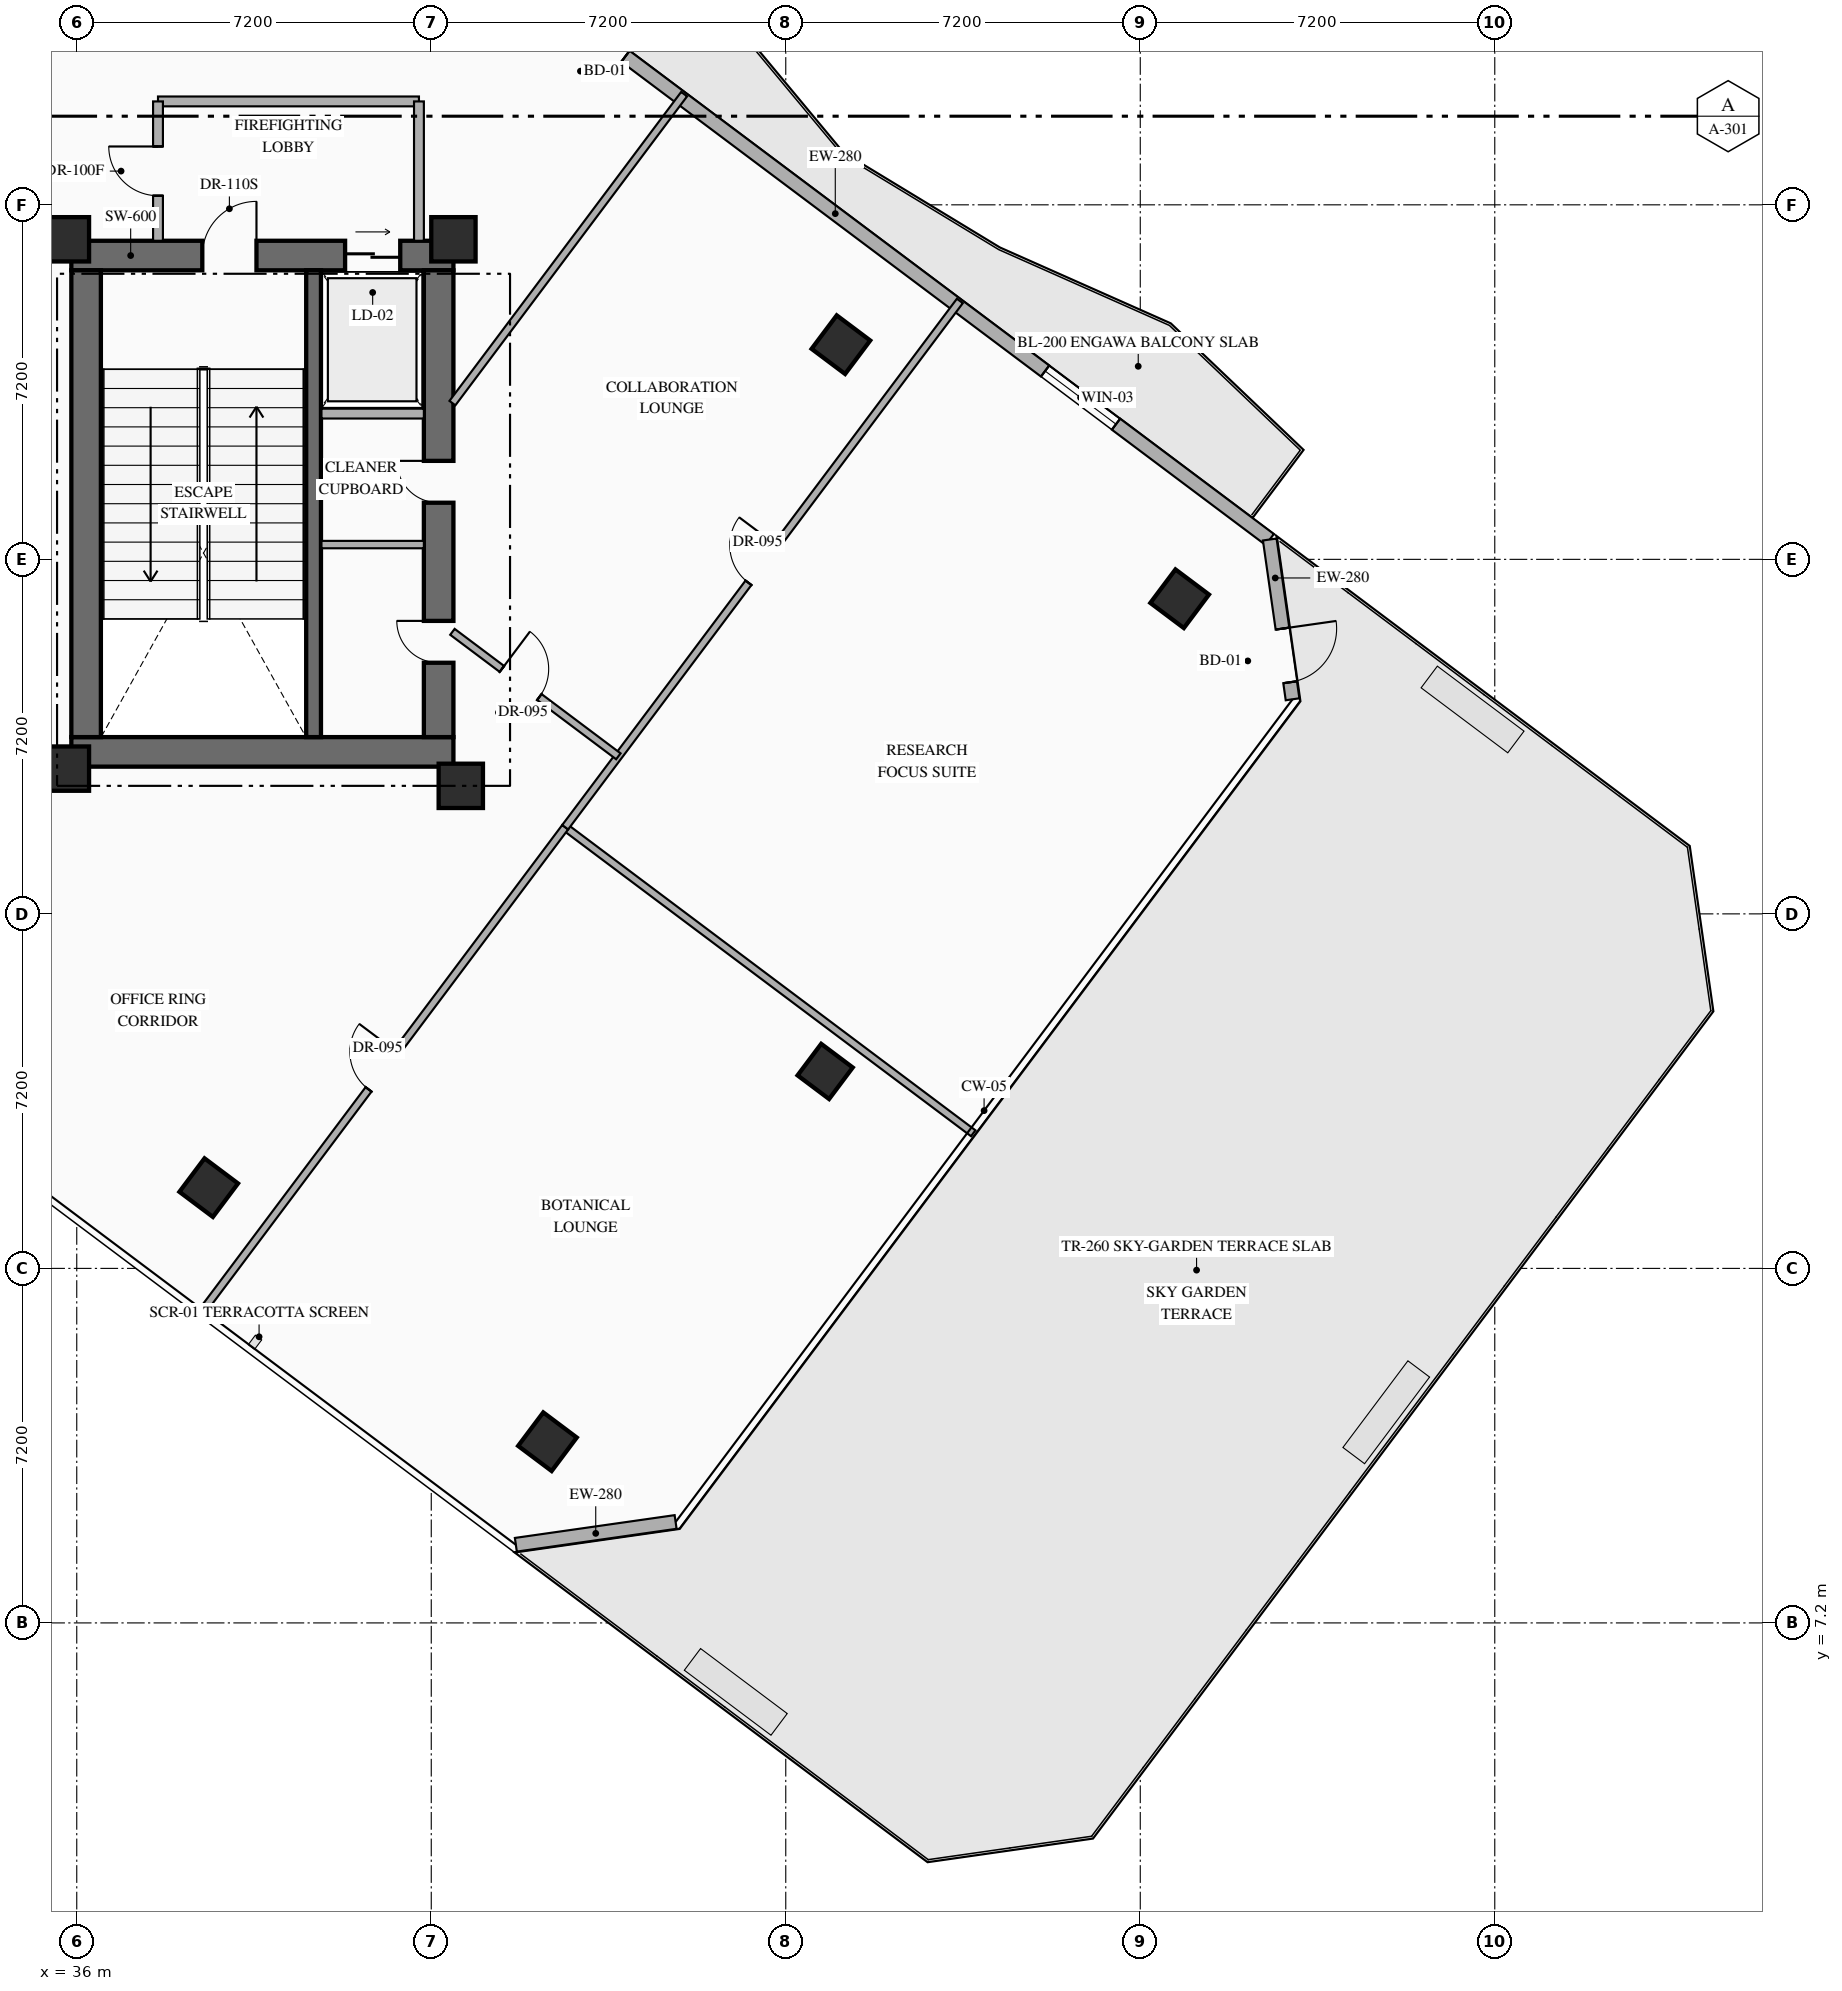
"""IFC4 building model, lengths in metres.
Left out: names, types, materials, properties, quantities, classifications, styles, units other than length and angle.
Written with IfcOpenShell. Run it as: python <this file> out.ifc"""

import sys

from ifc_helpers import new_model, si_unit, direction, frame, frame_2d, origin, origin_2d, place, context, subcontext, project, spatial, rectangle, hollow_rectangle, extrude, element, fill, save


model = new_model("IFC4")
c1 = context("Model", 3, precision=1e-05, world=origin(), true_north=direction((0.0, 1.0)))
c2 = subcontext(c1, "Body", "Model", "MODEL_VIEW")
j1 = project(units=[si_unit("LENGTHUNIT", "METRE"), si_unit("PLANEANGLEUNIT", "RADIAN")], contexts=[c1])
p1 = place(None, origin())
s1 = spatial("IfcSite", under=j1, at=p1, CompositionType="ELEMENT")
p2 = place(p1, origin())
s2 = spatial("IfcBuilding", under=s1, at=p2, CompositionType="ELEMENT")
p3 = place(p2, frame((0.0, 0.0, 130.05)))
s3 = spatial("IfcBuildingStorey", under=s2, at=p3, CompositionType="ELEMENT", Elevation=130.05)
p4 = place(p3, frame((35.89, 24.89, 0.0), z_axis=(0.0, 0.0, 1.0), x_axis=(1.0, 0.0, 0.0)))
e1 = element("IfcWall", 1, at=p4, inside=s3, PredefinedType="SHEAR", context=c2, shape_type="SweptSolid", body=[
    extrude(rectangle(XDim=7.76, YDim=0.6, at=frame_2d((3.88, 0.0))), origin(), (0.0, 0.0, 1.0), 4.8),
])
p5 = place(p3, frame((35.89, 34.97, 0.0), z_axis=(0.0, 0.0, 1.0), x_axis=(1.0, 0.0, 0.0)))
e2 = element("IfcWall", 2, at=p5, inside=s3, PredefinedType="SHEAR", context=c2, shape_type="SweptSolid", body=[
    extrude(rectangle(XDim=7.76, YDim=0.6, at=frame_2d((3.88, 0.0))), origin(), (0.0, 0.0, 1.0), 4.8),
])
p6 = place(p5, frame((2.66, 0.0, 0.0)))
e3 = element("IfcOpeningElement", 3, at=p6, cuts=e2, PredefinedType="OPENING", context=c2, shape_type="SweptSolid", body=[
    extrude(rectangle(XDim=1.1, YDim=2.2, at=frame_2d((0.55, 1.1))), frame((0.0, 0.31, 0.0), z_axis=(0.0, -1.0, 0.0), x_axis=(1.0, 0.0, 0.0)), (0.0, 0.0, 1.0), 0.62),
])
p7 = place(p5, frame((5.56, 0.0, 0.0)))
e4 = element("IfcOpeningElement", 4, at=p7, cuts=e2, PredefinedType="OPENING", context=c2, shape_type="SweptSolid", body=[
    extrude(rectangle(XDim=1.12, YDim=2.15, at=frame_2d((0.56, 1.075))), frame((0.0, 0.31, 0.0), z_axis=(0.0, -1.0, 0.0), x_axis=(1.0, 0.0, 0.0)), (0.0, 0.0, 1.0), 0.62),
])
p8 = place(p3, frame((36.19, 25.19, 0.0), z_axis=(0.0, 0.0, 1.0), x_axis=(0.0, 1.0, 0.0)))
e5 = element("IfcWall", 5, at=p8, inside=s3, PredefinedType="SHEAR", context=c2, shape_type="SweptSolid", body=[
    extrude(rectangle(XDim=9.48, YDim=0.6, at=frame_2d((4.74, 0.0))), origin(), (0.0, 0.0, 1.0), 4.8),
])
p9 = place(p3, frame((43.35, 25.19, 0.0), z_axis=(0.0, 0.0, 1.0), x_axis=(0.0, 1.0, 0.0)))
e6 = element("IfcWall", 6, at=p9, inside=s3, PredefinedType="SHEAR", context=c2, shape_type="SweptSolid", body=[
    extrude(rectangle(XDim=9.48, YDim=0.6, at=frame_2d((4.74, 0.0))), origin(), (0.0, 0.0, 1.0), 4.8),
])
p10 = place(p9, frame((1.51, 0.0, 0.0)))
e7 = element("IfcOpeningElement", 7, at=p10, cuts=e6, PredefinedType="OPENING", context=c2, shape_type="SweptSolid", body=[
    extrude(rectangle(XDim=0.85, YDim=2.08, at=frame_2d((0.425, 1.04))), frame((0.0, 0.31, 0.0), z_axis=(0.0, -1.0, 0.0), x_axis=(1.0, 0.0, 0.0)), (0.0, 0.0, 1.0), 0.62),
])
p11 = place(p9, frame((4.76, 0.0, 0.0)))
e8 = element("IfcOpeningElement", 8, at=p11, cuts=e6, PredefinedType="OPENING", context=c2, shape_type="SweptSolid", body=[
    extrude(rectangle(XDim=0.85, YDim=2.08, at=frame_2d((0.425, 1.04))), frame((0.0, 0.31, 0.0), z_axis=(0.0, -1.0, 0.0), x_axis=(1.0, 0.0, 0.0)), (0.0, 0.0, 1.0), 0.62),
])
p12 = place(p3, frame((40.81, 25.19, 0.0), z_axis=(0.0, 0.0, 1.0), x_axis=(0.0, 1.0, 0.0)))
e9 = element("IfcWall", 9, at=p12, inside=s3, PredefinedType="SHEAR", context=c2, shape_type="SweptSolid", body=[
    extrude(rectangle(XDim=9.48, YDim=0.3, at=frame_2d((4.74, 0.0))), origin(), (0.0, 0.0, 1.0), 4.8),
])
for number, where, z_axis, x_axis in (
    (10, (35.8, 24.55, 0.0), (0.0, 0.0, 1.0), (1.0, 0.0, 0.0)),
    (11, (43.8, 24.2, 0.0), (0.0, 0.0, 1.0), (1.0, 0.0, 0.0)),
    (12, (35.8, 35.3, 0.0), (0.0, 0.0, 1.0), (1.0, 0.0, 0.0)),
    (13, (43.65, 35.3, 0.0), (0.0, 0.0, 1.0), (1.0, 0.0, 0.0)),
):
    element("IfcColumn", number, at=place(p3, frame(where, z_axis=z_axis, x_axis=x_axis)), inside=s3, PredefinedType="COLUMN", context=c2, shape_type="SweptSolid", body=[
        extrude(rectangle(XDim=0.9, YDim=0.9, at=origin_2d()), origin(), (0.0, 0.0, 1.0), 4.8),
    ])
for number, where, z_axis, x_axis in (
    (14, (38.68, 16.04, 0.0), (0.0, 0.0, 1.0), (0.8, -0.6, 0.0)),
    (15, (51.52, 33.16, 0.0), (0.0, 0.0, 1.0), (0.8, -0.6, 0.0)),
    (16, (45.56, 10.88, 0.0), (0.0, 0.0, 1.0), (0.8, -0.6, 0.0)),
    (17, (58.4, 28.0, 0.0), (0.0, 0.0, 1.0), (0.8, -0.6, 0.0)),
):
    element("IfcColumn", number, at=place(p3, frame(where, z_axis=z_axis, x_axis=x_axis)), inside=s3, PredefinedType="COLUMN", context=c2, shape_type="SweptSolid", body=[
        extrude(hollow_rectangle(XDim=0.85, YDim=0.85, WallThickness=0.032, at=origin_2d()), origin(), (0.0, 0.0, 1.0), 4.8),
    ])
p13 = place(p3, frame((51.2, 18.4, 0.0), z_axis=(0.0, 0.0, 1.0), x_axis=(0.799999996291, -0.600000004945, 0.0)))
e18 = element("IfcColumn", 18, at=p13, inside=s3, PredefinedType="COLUMN", context=c2, shape_type="SweptSolid", body=[
    extrude(hollow_rectangle(XDim=0.8, YDim=0.8, WallThickness=0.032, at=origin_2d()), origin(), (0.0, 0.0, 1.0), 4.8),
])
p14 = place(p3, frame((44.86, 40.73, 0.0), z_axis=(0.0, 0.0, 1.0), x_axis=(0.800007624502, -0.599989833863, 0.0)))
e19 = element("IfcWall", 19, at=p14, inside=s3, PredefinedType="STANDARD", context=c2, shape_type="SweptSolid", body=[
    extrude(rectangle(XDim=19.212, YDim=0.28, at=frame_2d((9.606, 0.0))), origin(), (0.0, 0.0, 1.0), 4.55),
])
p15 = place(p14, frame((1.755, 0.0, 0.0)))
e20 = element("IfcOpeningElement", 20, at=p15, cuts=e19, PredefinedType="OPENING", context=c2, shape_type="SweptSolid", body=[
    extrude(rectangle(XDim=1.1, YDim=2.2, at=frame_2d((0.55, 1.1))), frame((0.0, 0.15, 0.0), z_axis=(0.0, -1.0, 0.0), x_axis=(1.0, 0.0, 0.0)), (0.0, 0.0, 1.0), 0.3),
])
p16 = place(p14, frame((13.509, 0.0, 0.85)))
e21 = element("IfcOpeningElement", 21, at=p16, cuts=e19, PredefinedType="OPENING", context=c2, shape_type="SweptSolid", body=[
    extrude(rectangle(XDim=1.8, YDim=2.1, at=frame_2d((0.9, 1.05))), frame((0.0, 0.15, 0.0), z_axis=(0.0, -1.0, 0.0), x_axis=(1.0, 0.0, 0.0)), (0.0, 0.0, 1.0), 0.3),
])
p17 = place(p3, frame((60.23, 29.203, 0.0), z_axis=(0.0, 0.0, 1.0), x_axis=(0.141296221922, -0.989967361922, 0.0)))
e22 = element("IfcWall", 22, at=p17, inside=s3, PredefinedType="STANDARD", context=c2, shape_type="SweptSolid", body=[
    extrude(rectangle(XDim=3.278, YDim=0.28, at=frame_2d((1.639, 0.0))), origin(), (0.0, 0.0, 1.0), 4.55),
])
p18 = place(p17, frame((1.828, 0.0, 0.0)))
e23 = element("IfcOpeningElement", 23, at=p18, cuts=e22, PredefinedType="OPENING", context=c2, shape_type="SweptSolid", body=[
    extrude(rectangle(XDim=1.1, YDim=2.2, at=frame_2d((0.55, 1.1))), frame((0.0, 0.15, 0.0), z_axis=(0.0, -1.0, 0.0), x_axis=(1.0, 0.0, 0.0)), (0.0, 0.0, 1.0), 0.3),
])
p19 = place(p3, frame((48.163, 9.25, 0.0), z_axis=(0.0, 0.0, 1.0), x_axis=(-0.989979263428, -0.141212810973, 0.0)))
e24 = element("IfcWall", 24, at=p19, inside=s3, PredefinedType="STANDARD", context=c2, shape_type="SweptSolid", body=[
    extrude(rectangle(XDim=3.278, YDim=0.28, at=frame_2d((1.639, 0.0))), origin(), (0.0, 0.0, 1.0), 4.55),
])
p20 = place(p3, frame((40.97, 31.76, 0.0), z_axis=(0.0, 0.0, 1.0), x_axis=(1.0, 0.0, 0.0)))
e25 = element("IfcWall", 25, at=p20, inside=s3, PredefinedType="STANDARD", context=c2, shape_type="SweptSolid", body=[
    extrude(rectangle(XDim=2.08, YDim=0.2, at=frame_2d((1.04, 0.0))), origin(), (0.0, 0.0, 1.0), 4.55),
])
p21 = place(p3, frame((40.97, 29.1, 0.0), z_axis=(0.0, 0.0, 1.0), x_axis=(1.0, 0.0, 0.0)))
e26 = element("IfcWall", 26, at=p21, inside=s3, PredefinedType="PARTITIONING", context=c2, shape_type="SweptSolid", body=[
    extrude(rectangle(XDim=2.08, YDim=0.15, at=frame_2d((1.04, 0.0))), origin(), (0.0, 0.0, 1.0), 4.55),
])
p22 = place(p3, frame((37.65, 38.1, 0.0), z_axis=(0.0, 0.0, 1.0), x_axis=(1.0, 0.0, 0.0)))
e27 = element("IfcWall", 27, at=p22, inside=s3, PredefinedType="STANDARD", context=c2, shape_type="SweptSolid", body=[
    extrude(rectangle(XDim=5.3, YDim=0.2, at=frame_2d((2.65, 0.0))), origin(), (0.0, 0.0, 1.0), 4.55),
])
p23 = place(p3, frame((42.95, 35.27, 0.0), z_axis=(0.0, 0.0, 1.0), x_axis=(0.0, 1.0, 0.0)))
e28 = element("IfcWall", 28, at=p23, inside=s3, PredefinedType="STANDARD", context=c2, shape_type="SweptSolid", body=[
    extrude(rectangle(XDim=2.83, YDim=0.2, at=frame_2d((1.415, 0.0))), origin(), (0.0, 0.0, 1.0), 4.55),
])
p24 = place(p3, frame((37.65, 35.27, 0.0), z_axis=(0.0, 0.0, 1.0), x_axis=(0.0, 1.0, 0.0)))
e29 = element("IfcWall", 29, at=p24, inside=s3, PredefinedType="STANDARD", context=c2, shape_type="SweptSolid", body=[
    extrude(rectangle(XDim=2.83, YDim=0.2, at=frame_2d((1.415, 0.0))), origin(), (0.0, 0.0, 1.0), 4.55),
])
p25 = place(p24, frame((0.915, 0.0, 0.0)))
e30 = element("IfcOpeningElement", 30, at=p25, cuts=e29, PredefinedType="OPENING", context=c2, shape_type="SweptSolid", body=[
    extrude(rectangle(XDim=1.0, YDim=2.2, at=frame_2d((0.5, 1.1))), frame((0.0, 0.11, 0.0), z_axis=(0.0, -1.0, 0.0), x_axis=(1.0, 0.0, 0.0)), (0.0, 0.0, 1.0), 0.22),
])
p26 = place(p3, frame((45.92, 23.36, 0.0), z_axis=(0.0, 0.0, 1.0), x_axis=(0.8, -0.6, 0.0)))
e31 = element("IfcWall", 31, at=p26, inside=s3, PredefinedType="PARTITIONING", context=c2, shape_type="SweptSolid", body=[
    extrude(rectangle(XDim=10.36, YDim=0.15, at=frame_2d((5.18, 0.0))), origin(), (0.0, 0.0, 1.0), 4.55),
])
p27 = place(p3, frame((38.504, 13.472, 0.0), z_axis=(0.0, 0.0, 1.0), x_axis=(0.599993679268, 0.80000474051, 0.0)))
e32 = element("IfcWall", 32, at=p27, inside=s3, PredefinedType="PARTITIONING", context=c2, shape_type="SweptSolid", body=[
    extrude(rectangle(XDim=12.36, YDim=0.15, at=frame_2d((6.18, 0.0))), origin(), (0.0, 0.0, 1.0), 4.55),
])
p28 = place(p27, frame((5.705, 0.0, 0.0)))
e33 = element("IfcOpeningElement", 33, at=p28, cuts=e32, PredefinedType="OPENING", context=c2, shape_type="SweptSolid", body=[
    extrude(rectangle(XDim=0.95, YDim=2.15, at=frame_2d((0.475, 1.075))), frame((0.0, 0.085, 0.0), z_axis=(0.0, -1.0, 0.0), x_axis=(1.0, 0.0, 0.0)), (0.0, 0.0, 1.0), 0.17),
])
p29 = place(p3, frame((45.92, 23.36, 0.0), z_axis=(0.0, 0.0, 1.0), x_axis=(0.600005847638, 0.799995614238, 0.0)))
e34 = element("IfcWall", 34, at=p29, inside=s3, PredefinedType="PARTITIONING", context=c2, shape_type="SweptSolid", body=[
    extrude(rectangle(XDim=13.36, YDim=0.15, at=frame_2d((6.68, 0.0))), origin(), (0.0, 0.0, 1.0), 4.55),
])
p30 = place(p29, frame((6.205, 0.0, 0.0)))
e35 = element("IfcOpeningElement", 35, at=p30, cuts=e34, PredefinedType="OPENING", context=c2, shape_type="SweptSolid", body=[
    extrude(rectangle(XDim=0.95, YDim=2.15, at=frame_2d((0.475, 1.075))), frame((0.0, 0.085, 0.0), z_axis=(0.0, -1.0, 0.0), x_axis=(1.0, 0.0, 0.0)), (0.0, 0.0, 1.0), 0.17),
])
p31 = place(p3, frame((43.63, 27.328, 0.0), z_axis=(0.0, 0.0, 1.0), x_axis=(0.799972182084, -0.600037088764, 0.0)))
e36 = element("IfcWall", 36, at=p31, inside=s3, PredefinedType="PARTITIONING", context=c2, shape_type="SweptSolid", body=[
    extrude(rectangle(XDim=4.213, YDim=0.15, at=frame_2d((2.106, 0.0))), origin(), (0.0, 0.0, 1.0), 4.245),
])
p32 = place(p31, frame((1.256, 0.0, 0.0)))
e37 = element("IfcOpeningElement", 37, at=p32, cuts=e36, PredefinedType="OPENING", context=c2, shape_type="SweptSolid", body=[
    extrude(rectangle(XDim=0.95, YDim=2.15, at=frame_2d((0.475, 1.075))), frame((0.0, 0.085, 0.0), z_axis=(0.0, -1.0, 0.0), x_axis=(1.0, 0.0, 0.0)), (0.0, 0.0, 1.0), 0.17),
])
p33 = place(p3, frame((43.63, 31.973, 0.0), z_axis=(0.0, 0.0, 1.0), x_axis=(0.599975099311, 0.800018674911, 0.0)))
e38 = element("IfcWall", 38, at=p33, inside=s3, PredefinedType="PARTITIONING", context=c2, shape_type="SweptSolid", body=[
    extrude(rectangle(XDim=7.844, YDim=0.15, at=frame_2d((3.922, 0.0))), origin(), (0.0, 0.0, 1.0), 4.55),
])
p34 = place(p15, origin())
e39 = element("IfcDoor", 39, at=p34, inside=s3, OperationType="SINGLE_SWING_LEFT", PredefinedType="DOOR", context=c2, shape_type="SweptSolid", body=[
    extrude(rectangle(XDim=1.1, YDim=2.2, at=frame_2d((0.55, 1.1))), frame((0.0, 0.025, 0.0), z_axis=(0.0, -1.0, 0.0), x_axis=(1.0, 0.0, 0.0)), (0.0, 0.0, 1.0), 0.05),
])
fill(e20, e39)
p35 = place(p16, origin())
e40 = element("IfcWindow", 40, at=p35, inside=s3, PartitioningType="SINGLE_PANEL", PredefinedType="WINDOW", context=c2, shape_type="SweptSolid", body=[
    extrude(rectangle(XDim=1.8, YDim=2.1, at=frame_2d((0.9, 1.05))), frame((0.0, 0.03, 0.0), z_axis=(0.0, -1.0, 0.0), x_axis=(1.0, 0.0, 0.0)), (0.0, 0.0, 1.0), 0.06),
])
fill(e21, e40)
p36 = place(p18, origin())
e41 = element("IfcDoor", 41, at=p36, inside=s3, OperationType="SINGLE_SWING_LEFT", PredefinedType="DOOR", context=c2, shape_type="SweptSolid", body=[
    extrude(rectangle(XDim=1.1, YDim=2.2, at=frame_2d((0.55, 1.1))), frame((0.0, 0.025, 0.0), z_axis=(0.0, -1.0, 0.0), x_axis=(1.0, 0.0, 0.0)), (0.0, 0.0, 1.0), 0.05),
])
fill(e23, e41)
p37 = place(p6, origin())
e42 = element("IfcDoor", 42, at=p37, inside=s3, OperationType="SINGLE_SWING_RIGHT", PredefinedType="DOOR", context=c2, shape_type="SweptSolid", body=[
    extrude(rectangle(XDim=1.1, YDim=2.2, at=frame_2d((0.55, 1.1))), frame((0.0, 0.025, 0.0), z_axis=(0.0, -1.0, 0.0), x_axis=(1.0, 0.0, 0.0)), (0.0, 0.0, 1.0), 0.05),
])
fill(e3, e42)
p38 = place(p7, origin())
e43 = element("IfcDoor", 43, at=p38, inside=s3, OperationType="SLIDING_TO_RIGHT", PredefinedType="USERDEFINED", context=c2, shape_type="SweptSolid", body=[
    extrude(rectangle(XDim=1.12, YDim=2.15, at=frame_2d((0.56, 1.075))), frame((0.0, 0.025, 0.0), z_axis=(0.0, -1.0, 0.0), x_axis=(1.0, 0.0, 0.0)), (0.0, 0.0, 1.0), 0.05),
])
fill(e4, e43)
p39 = place(p10, origin())
e44 = element("IfcDoor", 44, at=p39, inside=s3, OperationType="SINGLE_SWING_RIGHT", PredefinedType="DOOR", context=c2, shape_type="SweptSolid", body=[
    extrude(rectangle(XDim=0.85, YDim=2.08, at=frame_2d((0.425, 1.04))), frame((0.0, 0.025, 0.0), z_axis=(0.0, -1.0, 0.0), x_axis=(1.0, 0.0, 0.0)), (0.0, 0.0, 1.0), 0.05),
])
fill(e7, e44)
p40 = place(p11, origin())
e45 = element("IfcDoor", 45, at=p40, inside=s3, OperationType="SINGLE_SWING_RIGHT", PredefinedType="DOOR", context=c2, shape_type="SweptSolid", body=[
    extrude(rectangle(XDim=0.85, YDim=2.08, at=frame_2d((0.425, 1.04))), frame((0.0, 0.025, 0.0), z_axis=(0.0, -1.0, 0.0), x_axis=(1.0, 0.0, 0.0)), (0.0, 0.0, 1.0), 0.05),
])
fill(e8, e45)
p41 = place(p25, origin())
e46 = element("IfcDoor", 46, at=p41, inside=s3, OperationType="SINGLE_SWING_RIGHT", PredefinedType="DOOR", context=c2, shape_type="SweptSolid", body=[
    extrude(rectangle(XDim=1.0, YDim=2.2, at=frame_2d((0.5, 1.1))), frame((0.0, 0.025, 0.0), z_axis=(0.0, -1.0, 0.0), x_axis=(1.0, 0.0, 0.0)), (0.0, 0.0, 1.0), 0.05),
])
fill(e30, e46)
p42 = place(p28, origin())
e47 = element("IfcDoor", 47, at=p42, inside=s3, OperationType="SINGLE_SWING_RIGHT", PredefinedType="DOOR", context=c2, shape_type="SweptSolid", body=[
    extrude(rectangle(XDim=0.95, YDim=2.15, at=frame_2d((0.475, 1.075))), frame((0.0, 0.025, 0.0), z_axis=(0.0, -1.0, 0.0), x_axis=(1.0, 0.0, 0.0)), (0.0, 0.0, 1.0), 0.05),
])
fill(e33, e47)
p43 = place(p30, origin())
e48 = element("IfcDoor", 48, at=p43, inside=s3, OperationType="SINGLE_SWING_RIGHT", PredefinedType="DOOR", context=c2, shape_type="SweptSolid", body=[
    extrude(rectangle(XDim=0.95, YDim=2.15, at=frame_2d((0.475, 1.075))), frame((0.0, 0.025, 0.0), z_axis=(0.0, -1.0, 0.0), x_axis=(1.0, 0.0, 0.0)), (0.0, 0.0, 1.0), 0.05),
])
fill(e35, e48)
p44 = place(p32, origin())
e49 = element("IfcDoor", 49, at=p44, inside=s3, OperationType="SINGLE_SWING_LEFT", PredefinedType="DOOR", context=c2, shape_type="SweptSolid", body=[
    extrude(rectangle(XDim=0.95, YDim=2.15, at=frame_2d((0.475, 1.075))), frame((0.0, 0.025, 0.0), z_axis=(0.0, -1.0, 0.0), x_axis=(1.0, 0.0, 0.0)), (0.0, 0.0, 1.0), 0.05),
])
fill(e37, e49)
save(model, sys.argv[1])
